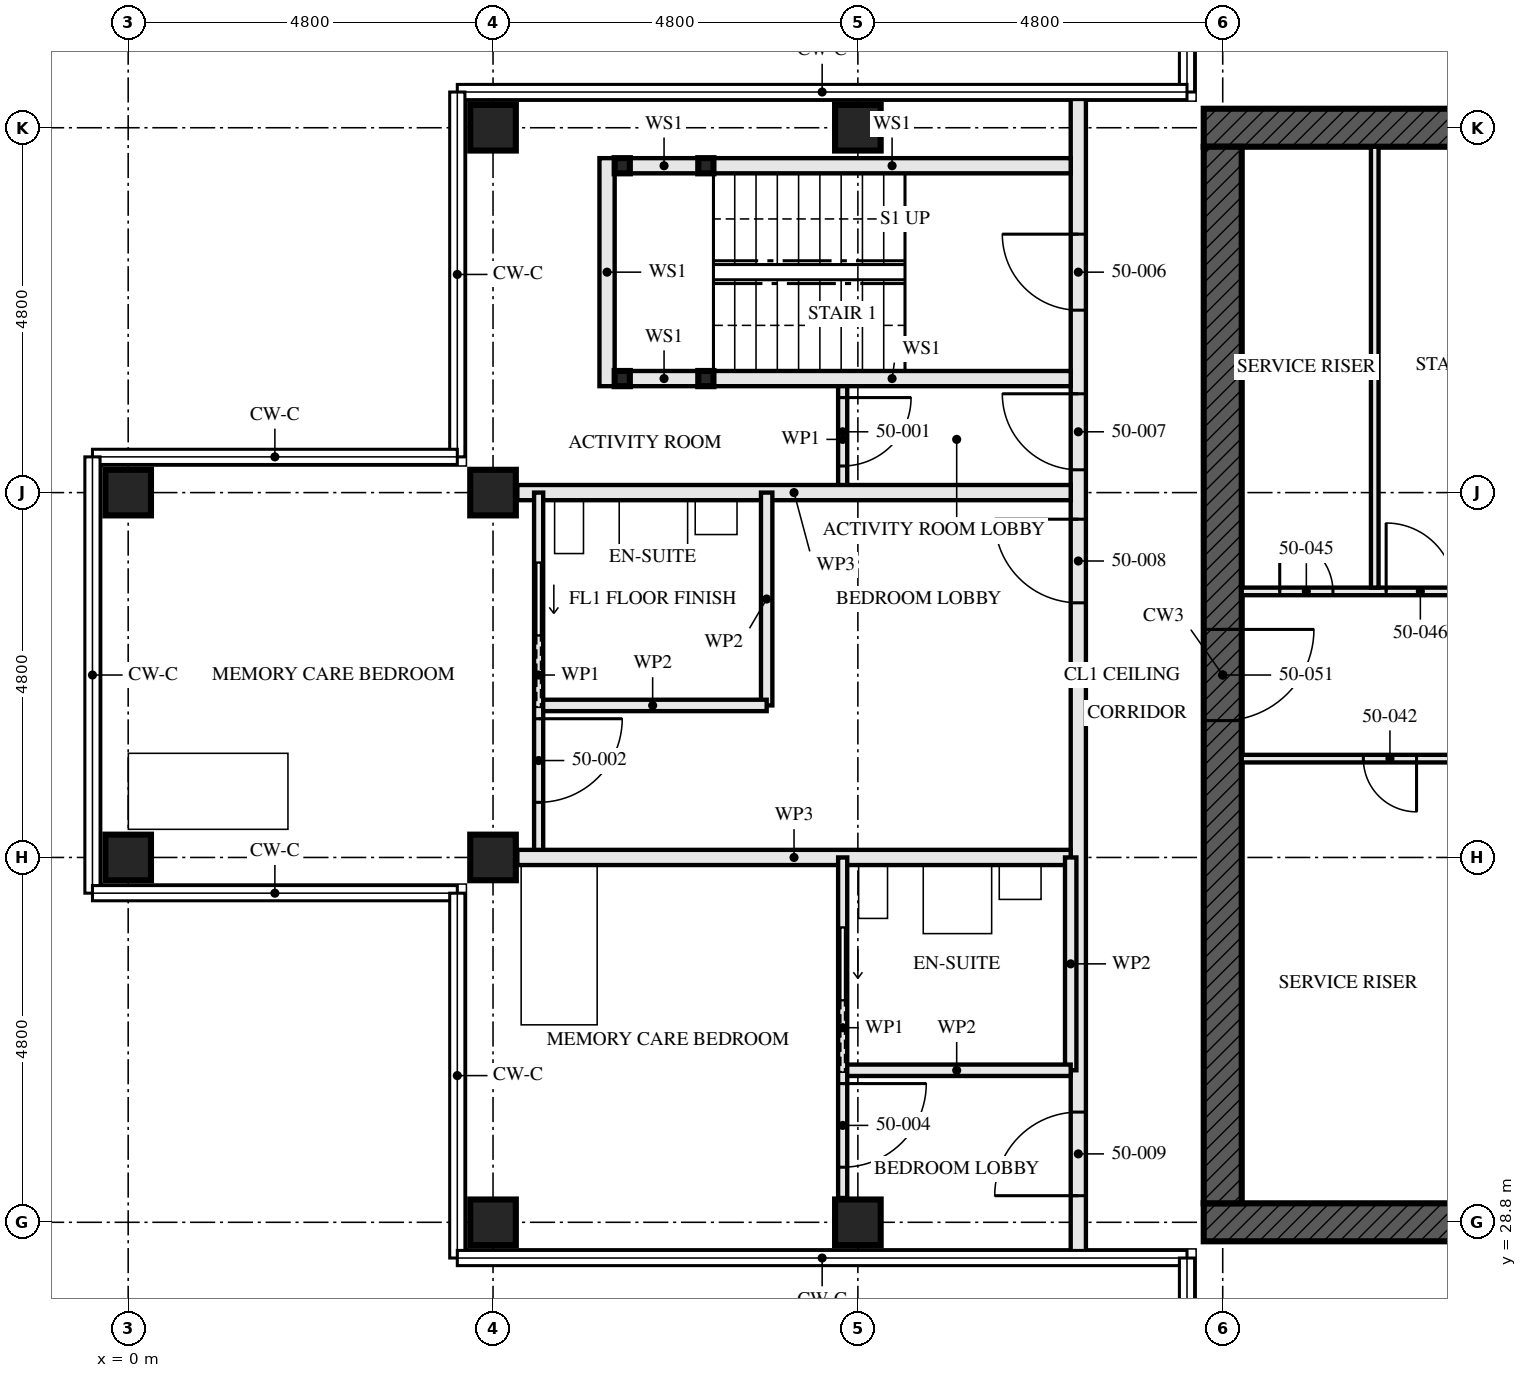
"""IFC4 building model, lengths in metres.
Left out: names, types, materials, properties, quantities, classifications, styles, units other than length and angle.
Written with IfcOpenShell. Run it as: python <this file> out.ifc"""

import sys

from ifc_helpers import new_model, si_unit, direction, frame, frame_2d, origin, origin_2d, place, context, subcontext, project, spatial, rectangle, hollow_rectangle, extrude, element, fill, save


model = new_model("IFC4")
c1 = context("Model", 3, precision=1e-05, world=origin(), true_north=direction((0.0, 1.0)))
c2 = subcontext(c1, "Body", "Model", "MODEL_VIEW")
j1 = project(units=[si_unit("LENGTHUNIT", "METRE"), si_unit("PLANEANGLEUNIT", "RADIAN")], contexts=[c1])
p1 = place(None, origin())
s1 = spatial("IfcSite", under=j1, at=p1, CompositionType="ELEMENT")
p2 = place(p1, origin())
s2 = spatial("IfcBuilding", under=s1, at=p2, CompositionType="ELEMENT")
p3 = place(p2, frame((0.0, 0.0, 183.0)))
s3 = spatial("IfcBuildingStorey", under=s2, at=p3, CompositionType="ELEMENT", Elevation=183.0)
for number, where, z_axis, x_axis in (
    (1, (0.0, 33.6, 0.0), (0.0, 0.0, 1.0), (0.0, 1.0, 0.0)),
    (2, (0.0, 38.4, 0.0), (0.0, 0.0, 1.0), (0.0, 1.0, 0.0)),
    (3, (4.8, 28.8, 0.0), (0.0, 0.0, 1.0), (0.0, 1.0, 0.0)),
    (4, (4.8, 33.6, 0.0), (0.0, 0.0, 1.0), (0.0, 1.0, 0.0)),
    (5, (4.8, 38.4, 0.0), (0.0, 0.0, 1.0), (0.0, 1.0, 0.0)),
    (6, (4.8, 43.2, 0.0), (0.0, 0.0, 1.0), (0.0, 1.0, 0.0)),
    (7, (9.6, 28.8, 0.0), (0.0, 0.0, 1.0), (0.0, 1.0, 0.0)),
    (8, (9.6, 43.2, 0.0), (0.0, 0.0, 1.0), (0.0, 1.0, 0.0)),
):
    element("IfcColumn", number, at=place(p3, frame(where, z_axis=z_axis, x_axis=x_axis)), inside=s3, PredefinedType="COLUMN", context=c2, shape_type="SweptSolid", body=[
        extrude(hollow_rectangle(XDim=0.6, YDim=0.6, WallThickness=0.08, at=origin_2d()), origin(), (0.0, 0.0, 1.0), 3.5),
    ])
p4 = place(p3, frame((14.15, 28.8, -0.17), z_axis=(0.0, 0.0, 1.0), x_axis=(1.0, 0.0, 0.0)))
e9 = element("IfcWall", 9, at=p4, inside=s3, PredefinedType="SHEAR", context=c2, shape_type="SweptSolid", body=[
    extrude(rectangle(XDim=14.9, YDim=0.5, at=frame_2d((7.45, 0.0))), origin(), (0.0, 0.0, 1.0), 3.5),
])
p5 = place(p4, frame((6.85, 0.0, 0.17)))
e10 = element("IfcOpeningElement", 10, at=p5, cuts=e9, PredefinedType="OPENING", context=c2, shape_type="SweptSolid", body=[
    extrude(rectangle(XDim=1.2, YDim=2.1, at=frame_2d((0.6, 1.05))), frame((0.0, 0.26, 0.0), z_axis=(0.0, -1.0, 0.0), x_axis=(1.0, 0.0, 0.0)), (0.0, 0.0, 1.0), 0.521),
])
p6 = place(p3, frame((29.05, 43.2, -0.17), z_axis=(0.0, 0.0, 1.0), x_axis=(-1.0, 0.0, 0.0)))
e11 = element("IfcWall", 11, at=p6, inside=s3, PredefinedType="SHEAR", context=c2, shape_type="SweptSolid", body=[
    extrude(rectangle(XDim=14.9, YDim=0.5, at=frame_2d((7.45, 0.0))), origin(), (0.0, 0.0, 1.0), 3.5),
])
p7 = place(p6, frame((6.85, 0.0, 0.17)))
e12 = element("IfcOpeningElement", 12, at=p7, cuts=e11, PredefinedType="OPENING", context=c2, shape_type="SweptSolid", body=[
    extrude(rectangle(XDim=1.2, YDim=2.1, at=frame_2d((0.6, 1.05))), frame((0.0, 0.26, 0.0), z_axis=(0.0, -1.0, 0.0), x_axis=(1.0, 0.0, 0.0)), (0.0, 0.0, 1.0), 0.521),
])
p8 = place(p3, frame((14.4, 42.95, -0.17), z_axis=(0.0, 0.0, 1.0), x_axis=(0.0, -1.0, 0.0)))
e13 = element("IfcWall", 13, at=p8, inside=s3, PredefinedType="SHEAR", context=c2, shape_type="SweptSolid", body=[
    extrude(rectangle(XDim=13.9, YDim=0.5, at=frame_2d((6.95, 0.0))), origin(), (0.0, 0.0, 1.0), 3.5),
])
p9 = place(p8, frame((6.35, 0.0, 0.17)))
e14 = element("IfcOpeningElement", 14, at=p9, cuts=e13, PredefinedType="OPENING", context=c2, shape_type="SweptSolid", body=[
    extrude(rectangle(XDim=1.2, YDim=2.1, at=frame_2d((0.6, 1.05))), frame((0.0, 0.26, 0.0), z_axis=(0.0, -1.0, 0.0), x_axis=(1.0, 0.0, 0.0)), (0.0, 0.0, 1.0), 0.521),
])
for number, where, z_axis, x_axis in (
    (15, (6.5, 42.7, 0.0), (0.0, 0.0, 1.0), (1.0, 0.0, 0.0)),
    (16, (6.5, 39.9, 0.0), (0.0, 0.0, 1.0), (1.0, 0.0, 0.0)),
    (17, (7.6, 42.7, 0.0), (0.0, 0.0, 1.0), (1.0, 0.0, 0.0)),
    (18, (7.6, 39.9, 0.0), (0.0, 0.0, 1.0), (1.0, 0.0, 0.0)),
):
    element("IfcColumn", number, at=place(p3, frame(where, z_axis=z_axis, x_axis=x_axis)), inside=s3, PredefinedType="COLUMN", context=c2, shape_type="SweptSolid", body=[
        extrude(hollow_rectangle(XDim=0.2, YDim=0.2, WallThickness=0.008, at=origin_2d()), origin(), (0.0, 0.0, 1.0), 3.33),
    ])
p10 = place(p3, frame((6.6, 42.7, 0.0), z_axis=(0.0, 0.0, 1.0), x_axis=(1.0, 0.0, 0.0)))
e19 = element("IfcWall", 19, at=p10, inside=s3, PredefinedType="SOLIDWALL", context=c2, shape_type="SweptSolid", body=[
    extrude(rectangle(XDim=0.9, YDim=0.2, at=frame_2d((0.45, 0.0))), origin(), (0.0, 0.0, 1.0), 2.99),
])
p11 = place(p3, frame((7.7, 42.7, 0.0), z_axis=(0.0, 0.0, 1.0), x_axis=(1.0, 0.0, 0.0)))
e20 = element("IfcWall", 20, at=p11, inside=s3, PredefinedType="SOLIDWALL", context=c2, shape_type="SweptSolid", body=[
    extrude(rectangle(XDim=4.7, YDim=0.2, at=frame_2d((2.35, 0.0))), origin(), (0.0, 0.0, 1.0), 2.99),
])
p12 = place(p3, frame((6.6, 39.9, 0.0), z_axis=(0.0, 0.0, 1.0), x_axis=(1.0, 0.0, 0.0)))
e21 = element("IfcWall", 21, at=p12, inside=s3, PredefinedType="SOLIDWALL", context=c2, shape_type="SweptSolid", body=[
    extrude(rectangle(XDim=0.9, YDim=0.2, at=frame_2d((0.45, 0.0))), origin(), (0.0, 0.0, 1.0), 2.99),
])
p13 = place(p3, frame((7.7, 39.9, 0.0), z_axis=(0.0, 0.0, 1.0), x_axis=(1.0, 0.0, 0.0)))
e22 = element("IfcWall", 22, at=p13, inside=s3, PredefinedType="SOLIDWALL", context=c2, shape_type="SweptSolid", body=[
    extrude(rectangle(XDim=4.7, YDim=0.2, at=frame_2d((2.35, 0.0))), origin(), (0.0, 0.0, 1.0), 2.99),
])
p14 = place(p3, frame((6.3, 42.8, 0.0), z_axis=(0.0, 0.0, 1.0), x_axis=(0.0, -1.0, 0.0)))
e23 = element("IfcWall", 23, at=p14, inside=s3, PredefinedType="SOLIDWALL", context=c2, shape_type="SweptSolid", body=[
    extrude(rectangle(XDim=3.0, YDim=0.2, at=frame_2d((1.5, 0.0))), origin(), (0.0, 0.0, 1.0), 3.33),
])
p15 = place(p3, frame((9.4, 39.8, 0.0), z_axis=(0.0, 0.0, 1.0), x_axis=(0.0, -1.0, 0.0)))
e24 = element("IfcWall", 24, at=p15, inside=s3, PredefinedType="PARTITIONING", context=c2, shape_type="SweptSolid", body=[
    extrude(rectangle(XDim=1.4, YDim=0.12, at=frame_2d((0.7, 0.0))), origin(), (0.0, 0.0, 1.0), 3.33),
])
p16 = place(p15, frame((0.15, 0.0, 0.0)))
e25 = element("IfcOpeningElement", 25, at=p16, cuts=e24, PredefinedType="OPENING", context=c2, shape_type="SweptSolid", body=[
    extrude(rectangle(XDim=0.9, YDim=2.1, at=frame_2d((0.45, 1.05))), frame((0.0, 0.071, 0.0), z_axis=(0.0, -1.0, 0.0), x_axis=(1.0, 0.0, 0.0)), (0.0, 0.0, 1.0), 0.141),
])
p17 = place(p3, frame((5.12, 38.4, 0.0), z_axis=(0.0, 0.0, 1.0), x_axis=(1.0, 0.0, 0.0)))
e26 = element("IfcWall", 26, at=p17, inside=s3, PredefinedType="PARTITIONING", context=c2, shape_type="SweptSolid", body=[
    extrude(rectangle(XDim=7.28, YDim=0.2, at=frame_2d((3.64, 0.0))), origin(), (0.0, 0.0, 1.0), 2.55),
])
p18 = place(p3, frame((5.4, 35.6, 0.0), z_axis=(0.0, 0.0, 1.0), x_axis=(1.0, 0.0, 0.0)))
e27 = element("IfcWall", 27, at=p18, inside=s3, PredefinedType="PARTITIONING", context=c2, shape_type="SweptSolid", body=[
    extrude(rectangle(XDim=3.0, YDim=0.15, at=frame_2d((1.5, 0.0))), origin(), (0.0, 0.0, 1.0), 3.33),
])
p19 = place(p3, frame((8.4, 38.4, 0.0), z_axis=(0.0, 0.0, 1.0), x_axis=(0.0, -1.0, 0.0)))
e28 = element("IfcWall", 28, at=p19, inside=s3, PredefinedType="PARTITIONING", context=c2, shape_type="SweptSolid", body=[
    extrude(rectangle(XDim=2.8, YDim=0.15, at=frame_2d((1.4, 0.0))), origin(), (0.0, 0.0, 1.0), 3.33),
])
p20 = place(p3, frame((5.4, 38.4, 0.0), z_axis=(0.0, 0.0, 1.0), x_axis=(0.0, -1.0, 0.0)))
e29 = element("IfcWall", 29, at=p20, inside=s3, PredefinedType="PARTITIONING", context=c2, shape_type="SweptSolid", body=[
    extrude(rectangle(XDim=4.8, YDim=0.12, at=frame_2d((2.4, 0.0))), origin(), (0.0, 0.0, 1.0), 3.33),
])
p21 = place(p20, frame((2.975, 0.0, 0.0)))
e30 = element("IfcOpeningElement", 30, at=p21, cuts=e29, PredefinedType="OPENING", context=c2, shape_type="SweptSolid", body=[
    extrude(rectangle(XDim=1.1, YDim=2.1, at=frame_2d((0.55, 1.05))), frame((0.0, 0.071, 0.0), z_axis=(0.0, -1.0, 0.0), x_axis=(1.0, 0.0, 0.0)), (0.0, 0.0, 1.0), 0.141),
])
p22 = place(p20, frame((0.925, 0.0, 0.0)))
e31 = element("IfcOpeningElement", 31, at=p22, cuts=e29, PredefinedType="OPENING", context=c2, shape_type="SweptSolid", body=[
    extrude(rectangle(XDim=0.95, YDim=2.1, at=frame_2d((0.475, 1.05))), frame((0.0, 0.071, 0.0), z_axis=(0.0, -1.0, 0.0), x_axis=(1.0, 0.0, 0.0)), (0.0, 0.0, 1.0), 0.141),
])
p23 = place(p3, frame((5.12, 33.6, 0.0), z_axis=(0.0, 0.0, 1.0), x_axis=(1.0, 0.0, 0.0)))
e32 = element("IfcWall", 32, at=p23, inside=s3, PredefinedType="PARTITIONING", context=c2, shape_type="SweptSolid", body=[
    extrude(rectangle(XDim=7.28, YDim=0.2, at=frame_2d((3.64, 0.0))), origin(), (0.0, 0.0, 1.0), 2.55),
])
p24 = place(p3, frame((9.4, 30.8, 0.0), z_axis=(0.0, 0.0, 1.0), x_axis=(1.0, 0.0, 0.0)))
e33 = element("IfcWall", 33, at=p24, inside=s3, PredefinedType="PARTITIONING", context=c2, shape_type="SweptSolid", body=[
    extrude(rectangle(XDim=3.0, YDim=0.15, at=frame_2d((1.5, 0.0))), origin(), (0.0, 0.0, 1.0), 3.33),
])
p25 = place(p3, frame((12.4, 33.6, 0.0), z_axis=(0.0, 0.0, 1.0), x_axis=(0.0, -1.0, 0.0)))
e34 = element("IfcWall", 34, at=p25, inside=s3, PredefinedType="PARTITIONING", context=c2, shape_type="SweptSolid", body=[
    extrude(rectangle(XDim=2.8, YDim=0.15, at=frame_2d((1.4, 0.0))), origin(), (0.0, 0.0, 1.0), 3.33),
])
p26 = place(p3, frame((9.4, 33.6, 0.0), z_axis=(0.0, 0.0, 1.0), x_axis=(0.0, -1.0, 0.0)))
e35 = element("IfcWall", 35, at=p26, inside=s3, PredefinedType="PARTITIONING", context=c2, shape_type="SweptSolid", body=[
    extrude(rectangle(XDim=4.48, YDim=0.12, at=frame_2d((2.24, 0.0))), origin(), (0.0, 0.0, 1.0), 3.33),
])
p27 = place(p26, frame((2.975, 0.0, 0.0)))
e36 = element("IfcOpeningElement", 36, at=p27, cuts=e35, PredefinedType="OPENING", context=c2, shape_type="SweptSolid", body=[
    extrude(rectangle(XDim=1.1, YDim=2.1, at=frame_2d((0.55, 1.05))), frame((0.0, 0.071, 0.0), z_axis=(0.0, -1.0, 0.0), x_axis=(1.0, 0.0, 0.0)), (0.0, 0.0, 1.0), 0.141),
])
p28 = place(p26, frame((0.925, 0.0, 0.0)))
e37 = element("IfcOpeningElement", 37, at=p28, cuts=e35, PredefinedType="OPENING", context=c2, shape_type="SweptSolid", body=[
    extrude(rectangle(XDim=0.95, YDim=2.1, at=frame_2d((0.475, 1.05))), frame((0.0, 0.071, 0.0), z_axis=(0.0, -1.0, 0.0), x_axis=(1.0, 0.0, 0.0)), (0.0, 0.0, 1.0), 0.141),
])
p29 = place(p3, frame((12.5, 43.65, 0.0), z_axis=(0.0, 0.0, 1.0), x_axis=(0.0, -1.0, 0.0)))
e38 = element("IfcWall", 38, at=p29, inside=s3, PredefinedType="PARTITIONING", context=c2, shape_type="SweptSolid", body=[
    extrude(rectangle(XDim=15.3, YDim=0.2, at=frame_2d((7.65, 0.0))), origin(), (0.0, 0.0, 1.0), 2.32),
])
p30 = place(p29, frame((1.85, 0.0, 0.0)))
e39 = element("IfcOpeningElement", 39, at=p30, cuts=e38, PredefinedType="OPENING", context=c2, shape_type="SweptSolid", body=[
    extrude(rectangle(XDim=1.0, YDim=2.1, at=frame_2d((0.5, 1.05))), frame((0.0, 0.111, 0.0), z_axis=(0.0, -1.0, 0.0), x_axis=(1.0, 0.0, 0.0)), (0.0, 0.0, 1.0), 0.221),
])
p31 = place(p29, frame((3.95, 0.0, 0.0)))
e40 = element("IfcOpeningElement", 40, at=p31, cuts=e38, PredefinedType="OPENING", context=c2, shape_type="SweptSolid", body=[
    extrude(rectangle(XDim=1.0, YDim=2.1, at=frame_2d((0.5, 1.05))), frame((0.0, 0.111, 0.0), z_axis=(0.0, -1.0, 0.0), x_axis=(1.0, 0.0, 0.0)), (0.0, 0.0, 1.0), 0.221),
])
p32 = place(p29, frame((5.6, 0.0, 0.0)))
e41 = element("IfcOpeningElement", 41, at=p32, cuts=e38, PredefinedType="OPENING", context=c2, shape_type="SweptSolid", body=[
    extrude(rectangle(XDim=1.1, YDim=2.1, at=frame_2d((0.55, 1.05))), frame((0.0, 0.111, 0.0), z_axis=(0.0, -1.0, 0.0), x_axis=(1.0, 0.0, 0.0)), (0.0, 0.0, 1.0), 0.221),
])
p33 = place(p29, frame((13.4, 0.0, 0.0)))
e42 = element("IfcOpeningElement", 42, at=p33, cuts=e38, PredefinedType="OPENING", context=c2, shape_type="SweptSolid", body=[
    extrude(rectangle(XDim=1.1, YDim=2.1, at=frame_2d((0.55, 1.05))), frame((0.0, 0.111, 0.0), z_axis=(0.0, -1.0, 0.0), x_axis=(1.0, 0.0, 0.0)), (0.0, 0.0, 1.0), 0.221),
])
p34 = place(p3, frame((16.4, 37.15, 0.0), z_axis=(0.0, 0.0, 1.0), x_axis=(0.0, 1.0, 0.0)))
e43 = element("IfcWall", 43, at=p34, inside=s3, PredefinedType="SOLIDWALL", context=c2, shape_type="SweptSolid", body=[
    extrude(rectangle(XDim=5.8, YDim=0.1, at=frame_2d((2.9, 0.0))), origin(), (0.0, 0.0, 1.0), 3.33),
])
p35 = place(p3, frame((14.65, 34.9, 0.0), z_axis=(0.0, 0.0, 1.0), x_axis=(1.0, 0.0, 0.0)))
e44 = element("IfcWall", 44, at=p35, inside=s3, PredefinedType="SOLIDWALL", context=c2, shape_type="SweptSolid", body=[
    extrude(rectangle(XDim=5.9, YDim=0.1, at=frame_2d((2.95, 0.0))), origin(), (0.0, 0.0, 1.0), 3.33),
])
p36 = place(p35, frame((1.6, 0.0, 0.0)))
e45 = element("IfcOpeningElement", 45, at=p36, cuts=e44, PredefinedType="OPENING", context=c2, shape_type="SweptSolid", body=[
    extrude(rectangle(XDim=0.7, YDim=2.1, at=frame_2d((0.35, 1.05))), frame((0.0, 0.061, 0.0), z_axis=(0.0, -1.0, 0.0), x_axis=(1.0, 0.0, 0.0)), (0.0, 0.0, 1.0), 0.121),
])
p37 = place(p3, frame((14.65, 37.1, 0.0), z_axis=(0.0, 0.0, 1.0), x_axis=(1.0, 0.0, 0.0)))
e46 = element("IfcWall", 46, at=p37, inside=s3, PredefinedType="SOLIDWALL", context=c2, shape_type="SweptSolid", body=[
    extrude(rectangle(XDim=5.9, YDim=0.1, at=frame_2d((2.95, 0.0))), origin(), (0.0, 0.0, 1.0), 3.33),
])
p38 = place(p37, frame((0.5, 0.0, 0.0)))
e47 = element("IfcOpeningElement", 47, at=p38, cuts=e46, PredefinedType="OPENING", context=c2, shape_type="SweptSolid", body=[
    extrude(rectangle(XDim=0.7, YDim=2.1, at=frame_2d((0.35, 1.05))), frame((0.0, 0.061, 0.0), z_axis=(0.0, -1.0, 0.0), x_axis=(1.0, 0.0, 0.0)), (0.0, 0.0, 1.0), 0.121),
])
p39 = place(p37, frame((1.9, 0.0, 0.0)))
e48 = element("IfcOpeningElement", 48, at=p39, cuts=e46, PredefinedType="OPENING", context=c2, shape_type="SweptSolid", body=[
    extrude(rectangle(XDim=0.9, YDim=2.1, at=frame_2d((0.45, 1.05))), frame((0.0, 0.061, 0.0), z_axis=(0.0, -1.0, 0.0), x_axis=(1.0, 0.0, 0.0)), (0.0, 0.0, 1.0), 0.121),
])
p40 = place(p16, origin())
e49 = element("IfcDoor", 49, at=p40, inside=s3, OperationType="SINGLE_SWING_RIGHT", PredefinedType="DOOR", context=c2, shape_type="SweptSolid", body=[
    extrude(rectangle(XDim=0.9, YDim=2.1, at=frame_2d((0.45, 1.05))), frame((0.0, 0.022, 0.0), z_axis=(0.0, -1.0, 0.0), x_axis=(1.0, 0.0, 0.0)), (0.0, 0.0, 1.0), 0.044),
])
fill(e25, e49)
p41 = place(p21, origin())
e50 = element("IfcDoor", 50, at=p41, inside=s3, OperationType="SINGLE_SWING_RIGHT", PredefinedType="DOOR", context=c2, shape_type="SweptSolid", body=[
    extrude(rectangle(XDim=1.1, YDim=2.1, at=frame_2d((0.55, 1.05))), frame((0.0, 0.022, 0.0), z_axis=(0.0, -1.0, 0.0), x_axis=(1.0, 0.0, 0.0)), (0.0, 0.0, 1.0), 0.044),
])
fill(e30, e50)
p42 = place(p22, origin())
e51 = element("IfcDoor", 51, at=p42, inside=s3, OperationType="SLIDING_TO_LEFT", PredefinedType="DOOR", context=c2, shape_type="SweptSolid", body=[
    extrude(rectangle(XDim=0.95, YDim=2.1, at=frame_2d((0.475, 1.05))), frame((0.0, 0.022, 0.0), z_axis=(0.0, -1.0, 0.0), x_axis=(1.0, 0.0, 0.0)), (0.0, 0.0, 1.0), 0.044),
])
fill(e31, e51)
p43 = place(p27, origin())
e52 = element("IfcDoor", 52, at=p43, inside=s3, OperationType="SINGLE_SWING_RIGHT", PredefinedType="DOOR", context=c2, shape_type="SweptSolid", body=[
    extrude(rectangle(XDim=1.1, YDim=2.1, at=frame_2d((0.55, 1.05))), frame((0.0, 0.022, 0.0), z_axis=(0.0, -1.0, 0.0), x_axis=(1.0, 0.0, 0.0)), (0.0, 0.0, 1.0), 0.044),
])
fill(e36, e52)
p44 = place(p28, origin())
e53 = element("IfcDoor", 53, at=p44, inside=s3, OperationType="SLIDING_TO_LEFT", PredefinedType="DOOR", context=c2, shape_type="SweptSolid", body=[
    extrude(rectangle(XDim=0.95, YDim=2.1, at=frame_2d((0.475, 1.05))), frame((0.0, 0.022, 0.0), z_axis=(0.0, -1.0, 0.0), x_axis=(1.0, 0.0, 0.0)), (0.0, 0.0, 1.0), 0.044),
])
fill(e37, e53)
p45 = place(p30, frame((1.0, 0.0, 0.0), z_axis=(0.0, 0.0, 1.0), x_axis=(-1.0, 0.0, 0.0)))
e54 = element("IfcDoor", 54, at=p45, inside=s3, OperationType="SINGLE_SWING_LEFT", PredefinedType="DOOR", context=c2, shape_type="SweptSolid", body=[
    extrude(rectangle(XDim=1.0, YDim=2.1, at=frame_2d((0.5, 1.05))), frame((0.0, 0.032, 0.0), z_axis=(0.0, -1.0, 0.0), x_axis=(1.0, 0.0, 0.0)), (0.0, 0.0, 1.0), 0.064),
])
fill(e39, e54)
p46 = place(p31, frame((1.0, 0.0, 0.0), z_axis=(0.0, 0.0, 1.0), x_axis=(-1.0, 0.0, 0.0)))
e55 = element("IfcDoor", 55, at=p46, inside=s3, OperationType="SINGLE_SWING_LEFT", PredefinedType="DOOR", context=c2, shape_type="SweptSolid", body=[
    extrude(rectangle(XDim=1.0, YDim=2.1, at=frame_2d((0.5, 1.05))), frame((0.0, 0.027, 0.0), z_axis=(0.0, -1.0, 0.0), x_axis=(1.0, 0.0, 0.0)), (0.0, 0.0, 1.0), 0.054),
])
fill(e40, e55)
p47 = place(p32, frame((1.1, 0.0, 0.0), z_axis=(0.0, 0.0, 1.0), x_axis=(-1.0, 0.0, 0.0)))
e56 = element("IfcDoor", 56, at=p47, inside=s3, OperationType="SINGLE_SWING_LEFT", PredefinedType="DOOR", context=c2, shape_type="SweptSolid", body=[
    extrude(rectangle(XDim=1.1, YDim=2.1, at=frame_2d((0.55, 1.05))), frame((0.0, 0.027, 0.0), z_axis=(0.0, -1.0, 0.0), x_axis=(1.0, 0.0, 0.0)), (0.0, 0.0, 1.0), 0.054),
])
fill(e41, e56)
p48 = place(p33, frame((1.1, 0.0, 0.0), z_axis=(0.0, 0.0, 1.0), x_axis=(-1.0, 0.0, 0.0)))
e57 = element("IfcDoor", 57, at=p48, inside=s3, OperationType="SINGLE_SWING_RIGHT", PredefinedType="DOOR", context=c2, shape_type="SweptSolid", body=[
    extrude(rectangle(XDim=1.1, YDim=2.1, at=frame_2d((0.55, 1.05))), frame((0.0, 0.027, 0.0), z_axis=(0.0, -1.0, 0.0), x_axis=(1.0, 0.0, 0.0)), (0.0, 0.0, 1.0), 0.054),
])
fill(e42, e57)
p49 = place(p36, frame((0.7, 0.0, 0.0), z_axis=(0.0, 0.0, 1.0), x_axis=(-1.0, 0.0, 0.0)))
e58 = element("IfcDoor", 58, at=p49, inside=s3, OperationType="SINGLE_SWING_RIGHT", PredefinedType="DOOR", context=c2, shape_type="SweptSolid", body=[
    extrude(rectangle(XDim=0.7, YDim=2.1, at=frame_2d((0.35, 1.05))), frame((0.0, 0.027, 0.0), z_axis=(0.0, -1.0, 0.0), x_axis=(1.0, 0.0, 0.0)), (0.0, 0.0, 1.0), 0.054),
])
fill(e45, e58)
p50 = place(p38, origin())
e59 = element("IfcDoor", 59, at=p50, inside=s3, OperationType="SINGLE_SWING_RIGHT", PredefinedType="DOOR", context=c2, shape_type="SweptSolid", body=[
    extrude(rectangle(XDim=0.7, YDim=2.1, at=frame_2d((0.35, 1.05))), frame((0.0, 0.027, 0.0), z_axis=(0.0, -1.0, 0.0), x_axis=(1.0, 0.0, 0.0)), (0.0, 0.0, 1.0), 0.054),
])
fill(e47, e59)
p51 = place(p39, origin())
e60 = element("IfcDoor", 60, at=p51, inside=s3, OperationType="SINGLE_SWING_RIGHT", PredefinedType="DOOR", context=c2, shape_type="SweptSolid", body=[
    extrude(rectangle(XDim=0.9, YDim=2.1, at=frame_2d((0.45, 1.05))), frame((0.0, 0.027, 0.0), z_axis=(0.0, -1.0, 0.0), x_axis=(1.0, 0.0, 0.0)), (0.0, 0.0, 1.0), 0.054),
])
fill(e48, e60)
p52 = place(p9, origin())
e61 = element("IfcDoor", 61, at=p52, inside=s3, OperationType="SINGLE_SWING_LEFT", PredefinedType="DOOR", context=c2, shape_type="SweptSolid", body=[
    extrude(rectangle(XDim=1.2, YDim=2.1, at=frame_2d((0.6, 1.05))), frame((0.0, 0.027, 0.0), z_axis=(0.0, -1.0, 0.0), x_axis=(1.0, 0.0, 0.0)), (0.0, 0.0, 1.0), 0.054),
])
fill(e14, e61)
save(model, sys.argv[1])
